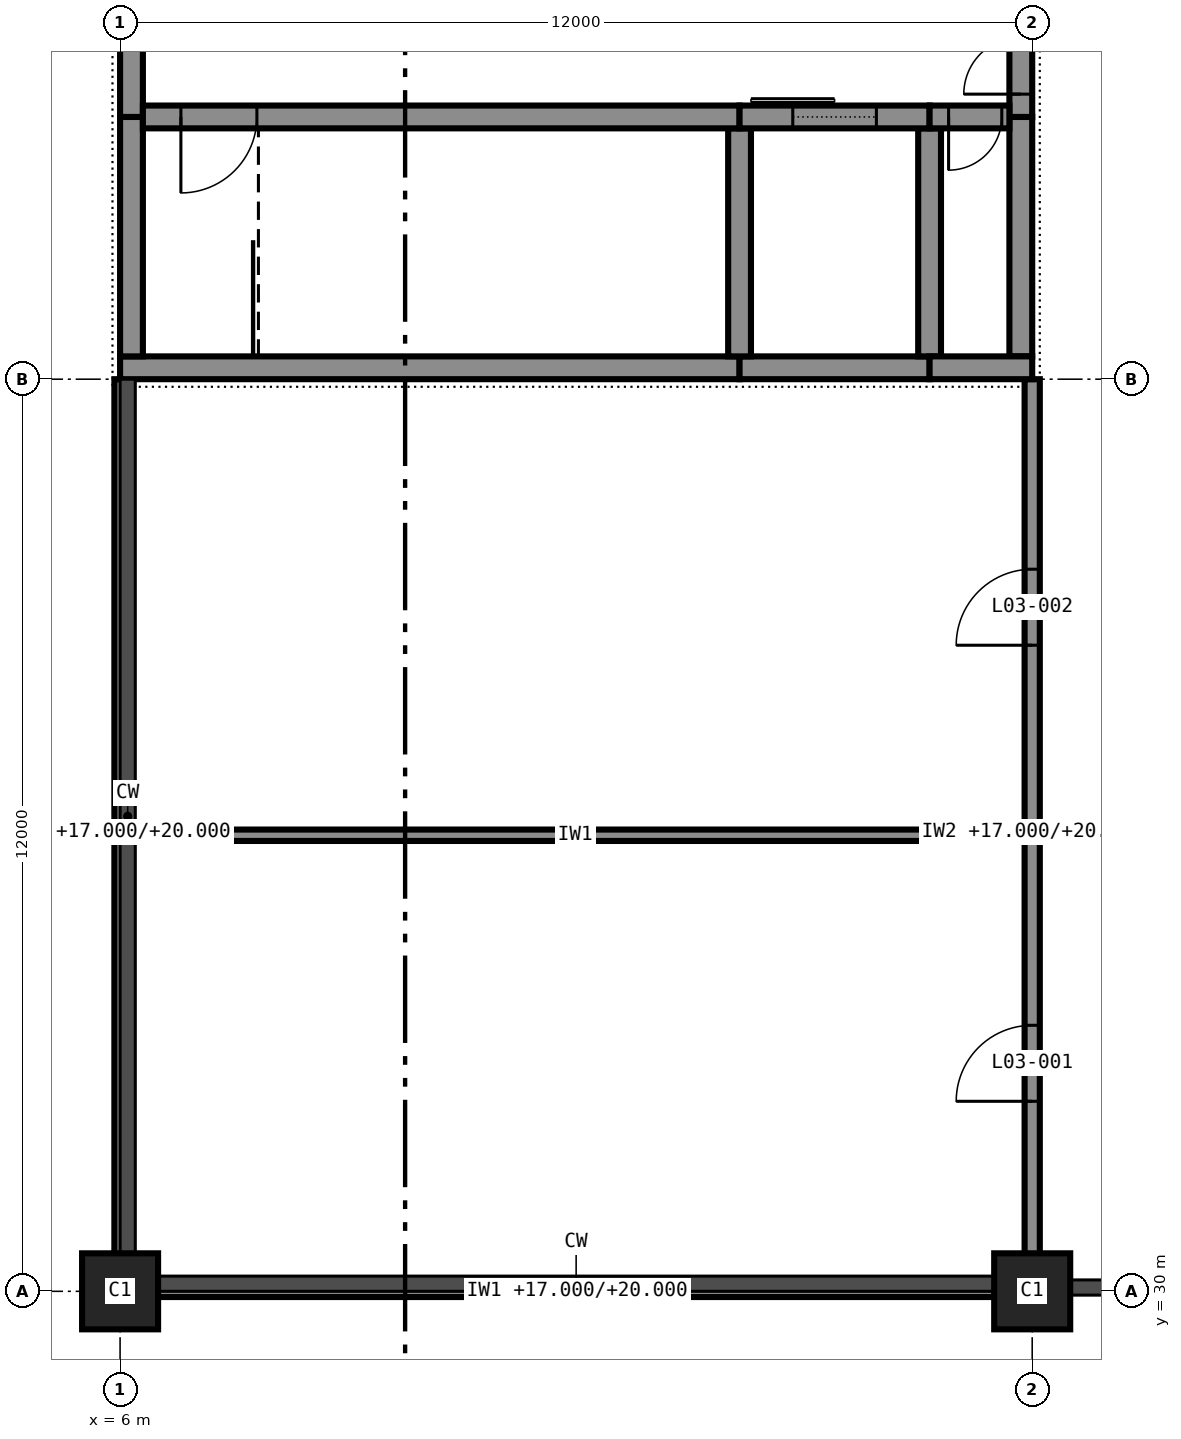
"""IFC4 building model, lengths in metres.
Left out: names, types, materials, properties, quantities, classifications, styles, units other than length and angle.
Written with IfcOpenShell. Run it as: python <this file> out.ifc"""

import sys

from ifc_helpers import new_model, si_unit, direction, frame, frame_2d, origin, origin_2d, place, context, subcontext, project, spatial, rectangle, extrude, element, fill, save


model = new_model("IFC4")
c1 = context("Model", 3, precision=1e-05, world=origin(), true_north=direction((0.0, 1.0)))
c2 = subcontext(c1, "Body", "Model", "MODEL_VIEW")
j1 = project(units=[si_unit("LENGTHUNIT", "METRE"), si_unit("PLANEANGLEUNIT", "RADIAN")], contexts=[c1])
p1 = place(None, origin())
s1 = spatial("IfcSite", under=j1, at=p1, CompositionType="ELEMENT")
p2 = place(p1, origin())
s2 = spatial("IfcBuilding", under=s1, at=p2, CompositionType="ELEMENT")
p3 = place(p2, frame((0.0, 0.0, 17.0)))
s3 = spatial("IfcBuildingStorey", under=s2, at=p3, CompositionType="ELEMENT", Elevation=17.0)
for number, where, z_axis, x_axis in (
    (1, (6.0, 30.0, 0.0), (0.0, 0.0, 1.0), (1.0, 0.0, 0.0)),
    (2, (18.0, 30.0, 0.0), (0.0, 0.0, 1.0), (1.0, 0.0, 0.0)),
):
    element("IfcColumn", number, at=place(p3, frame(where, z_axis=z_axis, x_axis=x_axis)), inside=s3, PredefinedType="COLUMN", context=c2, shape_type="SweptSolid", body=[
        extrude(rectangle(XDim=1.0, YDim=1.0, at=origin_2d()), origin(), (0.0, 0.0, 1.0), 4.0),
    ])
p4 = place(p3, frame((6.0, 42.15, 0.0), z_axis=(0.0, 0.0, 1.0), x_axis=(1.0, 0.0, 0.0)))
e3 = element("IfcWall", 3, at=p4, inside=s3, PredefinedType="SHEAR", context=c2, shape_type="SweptSolid", body=[
    extrude(rectangle(XDim=8.15, YDim=0.3, at=frame_2d((4.075, 0.0))), origin(), (0.0, 0.0, 1.0), 3.8),
])
p5 = place(p3, frame((14.15, 42.15, 0.0), z_axis=(0.0, 0.0, 1.0), x_axis=(1.0, 0.0, 0.0)))
e4 = element("IfcWall", 4, at=p5, inside=s3, PredefinedType="SHEAR", context=c2, shape_type="SweptSolid", body=[
    extrude(rectangle(XDim=2.5, YDim=0.3, at=frame_2d((1.25, 0.0))), origin(), (0.0, 0.0, 1.0), 3.8),
])
p6 = place(p3, frame((16.65, 42.15, 0.0), z_axis=(0.0, 0.0, 1.0), x_axis=(1.0, 0.0, 0.0)))
e5 = element("IfcWall", 5, at=p6, inside=s3, PredefinedType="SHEAR", context=c2, shape_type="SweptSolid", body=[
    extrude(rectangle(XDim=1.35, YDim=0.3, at=frame_2d((0.675, 0.0))), origin(), (0.0, 0.0, 1.0), 3.8),
])
p7 = place(p3, frame((6.3, 45.45, 0.0), z_axis=(0.0, 0.0, 1.0), x_axis=(1.0, 0.0, 0.0)))
e6 = element("IfcWall", 6, at=p7, inside=s3, PredefinedType="SHEAR", context=c2, shape_type="SweptSolid", body=[
    extrude(rectangle(XDim=7.85, YDim=0.3, at=frame_2d((3.925, 0.0))), origin(), (0.0, 0.0, 1.0), 3.8),
])
p8 = place(p7, frame((0.5, 0.0, 0.0)))
e7 = element("IfcOpeningElement", 7, at=p8, cuts=e6, PredefinedType="OPENING", context=c2, shape_type="SweptSolid", body=[
    extrude(rectangle(XDim=1.0, YDim=2.1, at=frame_2d((0.5, 1.05))), frame((0.0, 0.16, 0.0), z_axis=(0.0, -1.0, 0.0), x_axis=(1.0, 0.0, 0.0)), (0.0, 0.0, 1.0), 0.32),
])
p9 = place(p3, frame((14.15, 45.45, 0.0), z_axis=(0.0, 0.0, 1.0), x_axis=(1.0, 0.0, 0.0)))
e8 = element("IfcWall", 8, at=p9, inside=s3, PredefinedType="SHEAR", context=c2, shape_type="SweptSolid", body=[
    extrude(rectangle(XDim=2.5, YDim=0.3, at=frame_2d((1.25, 0.0))), origin(), (0.0, 0.0, 1.0), 3.8),
])
p10 = place(p9, frame((0.7, 0.0, 0.0)))
e9 = element("IfcOpeningElement", 9, at=p10, cuts=e8, PredefinedType="OPENING", context=c2, shape_type="SweptSolid", body=[
    extrude(rectangle(XDim=1.1, YDim=2.1, at=frame_2d((0.55, 1.05))), frame((0.0, 0.16, 0.0), z_axis=(0.0, -1.0, 0.0), x_axis=(1.0, 0.0, 0.0)), (0.0, 0.0, 1.0), 0.32),
])
p11 = place(p3, frame((16.65, 45.45, 0.0), z_axis=(0.0, 0.0, 1.0), x_axis=(1.0, 0.0, 0.0)))
e10 = element("IfcWall", 10, at=p11, inside=s3, PredefinedType="SHEAR", context=c2, shape_type="SweptSolid", body=[
    extrude(rectangle(XDim=1.05, YDim=0.3, at=frame_2d((0.525, 0.0))), origin(), (0.0, 0.0, 1.0), 3.8),
])
p12 = place(p11, frame((0.25, 0.0, 0.0)))
e11 = element("IfcOpeningElement", 11, at=p12, cuts=e10, PredefinedType="OPENING", context=c2, shape_type="SweptSolid", body=[
    extrude(rectangle(XDim=0.7, YDim=2.1, at=frame_2d((0.35, 1.05))), frame((0.0, 0.16, 0.0), z_axis=(0.0, -1.0, 0.0), x_axis=(1.0, 0.0, 0.0)), (0.0, 0.0, 1.0), 0.32),
])
p13 = place(p3, frame((6.15, 42.3, 0.0), z_axis=(0.0, 0.0, 1.0), x_axis=(0.0, 1.0, 0.0)))
e12 = element("IfcWall", 12, at=p13, inside=s3, PredefinedType="SHEAR", context=c2, shape_type="SweptSolid", body=[
    extrude(rectangle(XDim=3.15, YDim=0.3, at=frame_2d((1.575, 0.0))), origin(), (0.0, 0.0, 1.0), 3.8),
])
p14 = place(p3, frame((6.15, 45.45, 0.0), z_axis=(0.0, 0.0, 1.0), x_axis=(0.0, 1.0, 0.0)))
e13 = element("IfcWall", 13, at=p14, inside=s3, PredefinedType="SHEAR", context=c2, shape_type="SweptSolid", body=[
    extrude(rectangle(XDim=5.1, YDim=0.3, at=frame_2d((2.55, 0.0))), origin(), (0.0, 0.0, 1.0), 3.8),
])
p15 = place(p3, frame((17.85, 42.3, 0.0), z_axis=(0.0, 0.0, 1.0), x_axis=(0.0, 1.0, 0.0)))
e14 = element("IfcWall", 14, at=p15, inside=s3, PredefinedType="SHEAR", context=c2, shape_type="SweptSolid", body=[
    extrude(rectangle(XDim=3.15, YDim=0.3, at=frame_2d((1.575, 0.0))), origin(), (0.0, 0.0, 1.0), 3.8),
])
p16 = place(p3, frame((17.85, 45.45, 0.0), z_axis=(0.0, 0.0, 1.0), x_axis=(0.0, 1.0, 0.0)))
e15 = element("IfcWall", 15, at=p16, inside=s3, PredefinedType="SHEAR", context=c2, shape_type="SweptSolid", body=[
    extrude(rectangle(XDim=5.1, YDim=0.3, at=frame_2d((2.55, 0.0))), origin(), (0.0, 0.0, 1.0), 3.8),
])
p17 = place(p16, frame((0.3, 0.0, 0.0)))
e16 = element("IfcOpeningElement", 16, at=p17, cuts=e15, PredefinedType="OPENING", context=c2, shape_type="SweptSolid", body=[
    extrude(rectangle(XDim=1.5, YDim=2.1, at=frame_2d((0.75, 1.05))), frame((0.0, 0.16, 0.0), z_axis=(0.0, -1.0, 0.0), x_axis=(1.0, 0.0, 0.0)), (0.0, 0.0, 1.0), 0.32),
])
for number, where, z_axis, x_axis in (
    (17, (14.15, 42.3, 0.0), (0.0, 0.0, 1.0), (0.0, 1.0, 0.0)),
    (18, (16.65, 42.3, 0.0), (0.0, 0.0, 1.0), (0.0, 1.0, 0.0)),
):
    element("IfcWall", number, at=place(p3, frame(where, z_axis=z_axis, x_axis=x_axis)), inside=s3, PredefinedType="SHEAR", context=c2, shape_type="SweptSolid", body=[
        extrude(rectangle(XDim=3.0, YDim=0.3, at=frame_2d((1.5, 0.0))), origin(), (0.0, 0.0, 1.0), 3.8),
    ])
p18 = place(p3, frame((5.925, 30.0, 0.0), z_axis=(0.0, 0.0, 1.0), x_axis=(1.0, 0.0, 0.0)))
e19 = element("IfcWall", 19, at=p18, inside=s3, PredefinedType="PARTITIONING", context=c2, shape_type="SweptSolid", body=[
    extrude(rectangle(XDim=12.175, YDim=0.15, at=frame_2d((6.087, 0.0))), origin(), (0.0, 0.0, 1.0), 3.0),
])
p19 = place(p3, frame((6.075, 36.0, 0.0), z_axis=(0.0, 0.0, 1.0), x_axis=(1.0, 0.0, 0.0)))
e20 = element("IfcWall", 20, at=p19, inside=s3, PredefinedType="PARTITIONING", context=c2, shape_type="SweptSolid", body=[
    extrude(rectangle(XDim=11.825, YDim=0.15, at=frame_2d((5.913, 0.0))), origin(), (0.0, 0.0, 1.0), 3.8),
])
p20 = place(p3, frame((6.0, 30.075, 0.0), z_axis=(0.0, 0.0, 1.0), x_axis=(0.0, 1.0, 0.0)))
e21 = element("IfcWall", 21, at=p20, inside=s3, PredefinedType="PARTITIONING", context=c2, shape_type="SweptSolid", body=[
    extrude(rectangle(XDim=11.925, YDim=0.15, at=frame_2d((5.962, 0.0))), origin(), (0.0, 0.0, 1.0), 3.0),
])
p21 = place(p3, frame((18.0, 30.075, 0.0), z_axis=(0.0, 0.0, 1.0), x_axis=(0.0, 1.0, 0.0)))
e22 = element("IfcWall", 22, at=p21, inside=s3, PredefinedType="PARTITIONING", context=c2, shape_type="SweptSolid", body=[
    extrude(rectangle(XDim=11.925, YDim=0.2, at=frame_2d((5.962, 0.0))), origin(), (0.0, 0.0, 1.0), 3.0),
])
p22 = place(p21, frame((2.425, 0.0, 0.0)))
e23 = element("IfcOpeningElement", 23, at=p22, cuts=e22, PredefinedType="OPENING", context=c2, shape_type="SweptSolid", body=[
    extrude(rectangle(XDim=1.0, YDim=2.1, at=frame_2d((0.5, 1.05))), frame((0.0, 0.11, 0.0), z_axis=(0.0, -1.0, 0.0), x_axis=(1.0, 0.0, 0.0)), (0.0, 0.0, 1.0), 0.22),
])
p23 = place(p21, frame((8.425, 0.0, 0.0)))
e24 = element("IfcOpeningElement", 24, at=p23, cuts=e22, PredefinedType="OPENING", context=c2, shape_type="SweptSolid", body=[
    extrude(rectangle(XDim=1.0, YDim=2.1, at=frame_2d((0.5, 1.05))), frame((0.0, 0.11, 0.0), z_axis=(0.0, -1.0, 0.0), x_axis=(1.0, 0.0, 0.0)), (0.0, 0.0, 1.0), 0.22),
])
p24 = place(p22, origin())
e25 = element("IfcDoor", 25, at=p24, inside=s3, OperationType="SINGLE_SWING_RIGHT", PredefinedType="DOOR", context=c2, shape_type="SweptSolid", body=[
    extrude(rectangle(XDim=1.0, YDim=2.1, at=frame_2d((0.5, 1.05))), frame((0.0, 0.025, 0.0), z_axis=(0.0, -1.0, 0.0), x_axis=(1.0, 0.0, 0.0)), (0.0, 0.0, 1.0), 0.05),
])
fill(e23, e25)
p25 = place(p23, origin())
e26 = element("IfcDoor", 26, at=p25, inside=s3, OperationType="SINGLE_SWING_RIGHT", PredefinedType="DOOR", context=c2, shape_type="SweptSolid", body=[
    extrude(rectangle(XDim=1.0, YDim=2.1, at=frame_2d((0.5, 1.05))), frame((0.0, 0.025, 0.0), z_axis=(0.0, -1.0, 0.0), x_axis=(1.0, 0.0, 0.0)), (0.0, 0.0, 1.0), 0.05),
])
fill(e24, e26)
p26 = place(p8, frame((1.0, 0.0, 0.0), z_axis=(0.0, 0.0, 1.0), x_axis=(-1.0, 0.0, 0.0)))
e27 = element("IfcDoor", 27, at=p26, inside=s3, OperationType="SINGLE_SWING_LEFT", PredefinedType="DOOR", context=c2, shape_type="SweptSolid", body=[
    extrude(rectangle(XDim=1.0, YDim=2.1, at=frame_2d((0.5, 1.05))), frame((0.0, 0.025, 0.0), z_axis=(0.0, -1.0, 0.0), x_axis=(1.0, 0.0, 0.0)), (0.0, 0.0, 1.0), 0.05),
])
fill(e7, e27)
p27 = place(p10, origin())
e28 = element("IfcDoor", 28, at=p27, inside=s3, OperationType="SLIDING_TO_LEFT", PredefinedType="DOOR", context=c2, shape_type="SweptSolid", body=[
    extrude(rectangle(XDim=1.1, YDim=2.1, at=frame_2d((0.55, 1.05))), frame((0.0, 0.025, 0.0), z_axis=(0.0, -1.0, 0.0), x_axis=(1.0, 0.0, 0.0)), (0.0, 0.0, 1.0), 0.05),
])
fill(e9, e28)
p28 = place(p12, frame((0.7, 0.0, 0.0), z_axis=(0.0, 0.0, 1.0), x_axis=(-1.0, 0.0, 0.0)))
e29 = element("IfcDoor", 29, at=p28, inside=s3, OperationType="SINGLE_SWING_LEFT", PredefinedType="DOOR", context=c2, shape_type="SweptSolid", body=[
    extrude(rectangle(XDim=0.7, YDim=2.1, at=frame_2d((0.35, 1.05))), frame((0.0, 0.025, 0.0), z_axis=(0.0, -1.0, 0.0), x_axis=(1.0, 0.0, 0.0)), (0.0, 0.0, 1.0), 0.05),
])
fill(e11, e29)
p29 = place(p17, origin())
e30 = element("IfcDoor", 30, at=p29, inside=s3, OperationType="DOUBLE_DOOR_SINGLE_SWING", PredefinedType="DOOR", context=c2, shape_type="SweptSolid", body=[
    extrude(rectangle(XDim=1.5, YDim=2.1, at=frame_2d((0.75, 1.05))), frame((0.0, 0.025, 0.0), z_axis=(0.0, -1.0, 0.0), x_axis=(1.0, 0.0, 0.0)), (0.0, 0.0, 1.0), 0.05),
])
fill(e16, e30)
save(model, sys.argv[1])
